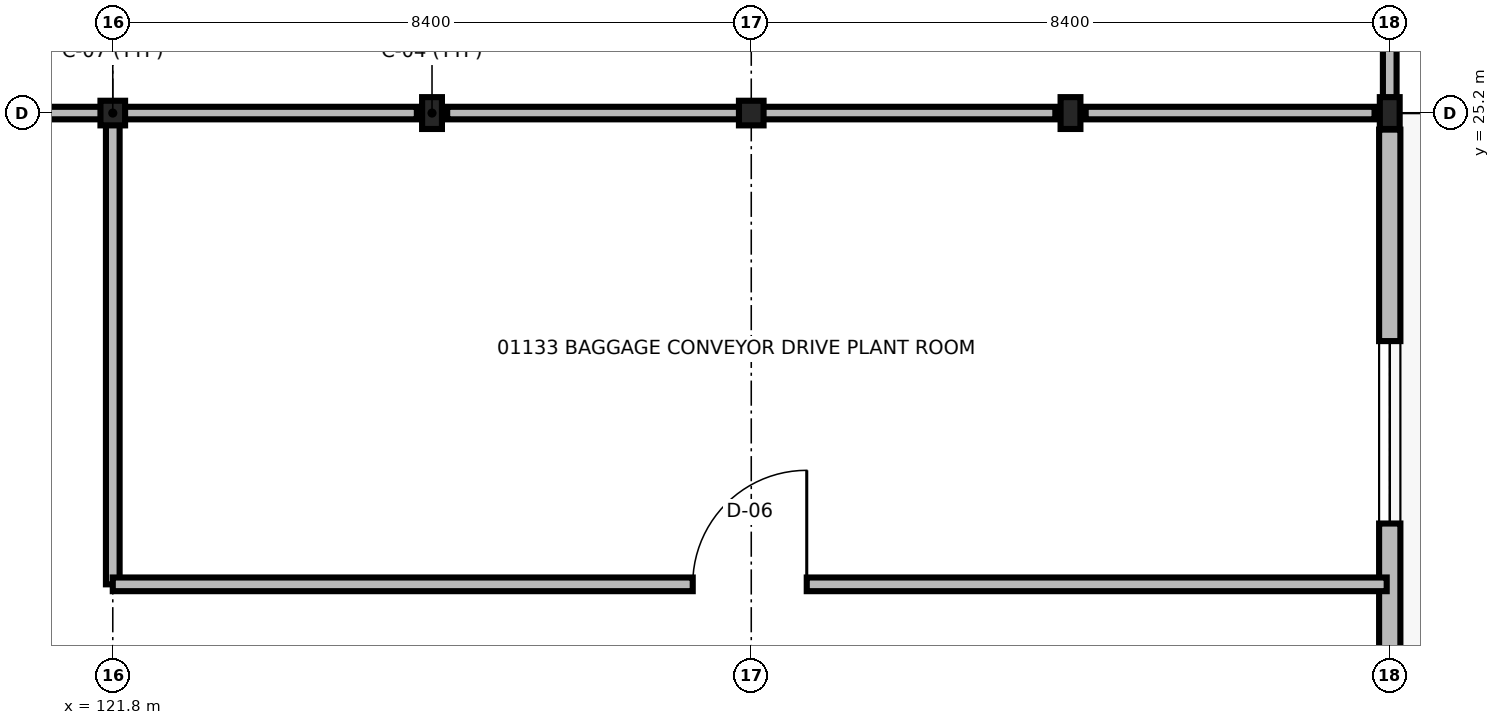
"""IFC4 building model, lengths in metres.
Left out: names, types, materials, properties, quantities, classifications, styles, units other than length and angle.
Written with IfcOpenShell. Run it as: python <this file> out.ifc"""

import sys

from ifc_helpers import new_model, si_unit, direction, frame, frame_2d, origin, origin_2d, place, context, subcontext, project, spatial, rectangle, hollow_circle, i_section, extrude, element, fill, save


model = new_model("IFC4")
c1 = context("Model", 3, precision=1e-05, world=origin(), true_north=direction((0.0, 1.0)))
c2 = subcontext(c1, "Body", "Model", "MODEL_VIEW")
j1 = project(units=[si_unit("LENGTHUNIT", "METRE"), si_unit("PLANEANGLEUNIT", "RADIAN")], contexts=[c1])
p1 = place(None, origin())
s1 = spatial("IfcSite", under=j1, at=p1, CompositionType="ELEMENT")
p2 = place(p1, origin())
s2 = spatial("IfcBuilding", under=s1, at=p2, CompositionType="ELEMENT")
p3 = place(p2, frame((0.0, 0.0, 5.1)))
s3 = spatial("IfcBuildingStorey", under=s2, at=p3, CompositionType="ELEMENT", Elevation=5.1)
for number, where, z_axis, x_axis in (
    (1, (121.8, 25.2, 0.0), (0.0, 0.0, 1.0), (1.0, 0.0, 0.0)),
    (2, (130.2, 25.2, 0.0), (0.0, 0.0, 1.0), (1.0, 0.0, 0.0)),
):
    element("IfcColumn", number, at=place(p3, frame(where, z_axis=z_axis, x_axis=x_axis)), inside=s3, PredefinedType="COLUMN", context=c2, shape_type="SweptSolid", body=[
        extrude(hollow_circle(Radius=0.162, WallThickness=0.013, at=origin_2d()), origin(), (0.0, 0.0, 1.0), 4.5),
    ])
for number, where, z_axis, x_axis in (
    (3, (138.6, 25.2, 0.0), (0.0, 0.0, 1.0), (1.0, 0.0, 0.0)),
    (4, (126.0, 25.2, 0.0), (0.0, 0.0, 1.0), (1.0, 0.0, 0.0)),
    (5, (134.4, 25.2, 0.0), (0.0, 0.0, 1.0), (1.0, 0.0, 0.0)),
):
    element("IfcColumn", number, at=place(p3, frame(where, z_axis=z_axis, x_axis=x_axis)), inside=s3, PredefinedType="COLUMN", context=c2, shape_type="SweptSolid", body=[
        extrude(i_section(OverallWidth=0.261, OverallDepth=0.419, WebThickness=0.012, FlangeThickness=0.019, at=origin_2d()), origin(), (0.0, 0.0, 1.0), 4.5),
    ])
p4 = place(p3, frame((138.6, 24.982, 0.0), z_axis=(0.0, 0.0, 1.0), x_axis=(0.0, -1.0, 0.0)))
e6 = element("IfcWall", 6, at=p4, inside=s3, PredefinedType="SOLIDWALL", context=c2, shape_type="SweptSolid", body=[
    extrude(rectangle(XDim=7.965, YDim=0.28, at=frame_2d((3.982, 0.0))), origin(), (0.0, 0.0, 1.0), 3.623),
])
p5 = place(p4, frame((2.782, 0.0, 0.95)))
e7 = element("IfcOpeningElement", 7, at=p5, cuts=e6, PredefinedType="OPENING", context=c2, shape_type="SweptSolid", body=[
    extrude(rectangle(XDim=2.4, YDim=1.75, at=frame_2d((1.2, 0.875))), frame((0.0, 0.15, 0.0), z_axis=(0.0, -1.0, 0.0), x_axis=(1.0, 0.0, 0.0)), (0.0, 0.0, 1.0), 0.3),
])
p6 = place(p3, frame((138.6, 25.4, 0.0), z_axis=(0.0, 0.0, 1.0), x_axis=(0.0, 1.0, 0.0)))
e8 = element("IfcWall", 8, at=p6, inside=s3, PredefinedType="PARTITIONING", context=c2, shape_type="SweptSolid", body=[
    extrude(rectangle(XDim=7.9, YDim=0.18, at=frame_2d((3.95, 0.0))), origin(), (0.0, 0.0, 1.0), 3.623),
])
p7 = place(p6, frame((3.025, 0.0, 0.0)))
e9 = element("IfcOpeningElement", 9, at=p7, cuts=e8, PredefinedType="OPENING", context=c2, shape_type="SweptSolid", body=[
    extrude(rectangle(XDim=1.85, YDim=2.3, at=frame_2d((0.925, 1.15))), frame((0.0, 0.1, 0.0), z_axis=(0.0, -1.0, 0.0), x_axis=(1.0, 0.0, 0.0)), (0.0, 0.0, 1.0), 0.2),
])
p8 = place(p3, frame((118.2, 25.2, 0.0), z_axis=(0.0, 0.0, 1.0), x_axis=(1.0, 0.0, 0.0)))
e10 = element("IfcWall", 10, at=p8, inside=s3, PredefinedType="PARTITIONING", context=c2, shape_type="SweptSolid", body=[
    extrude(rectangle(XDim=3.6, YDim=0.165, at=frame_2d((1.8, 0.0))), origin(), (0.0, 0.0, 1.0), 3.623),
])
p9 = place(p8, frame((0.95, 0.0, 0.0)))
e11 = element("IfcOpeningElement", 11, at=p9, cuts=e10, PredefinedType="OPENING", context=c2, shape_type="SweptSolid", body=[
    extrude(rectangle(XDim=1.7, YDim=2.25, at=frame_2d((0.85, 1.125))), frame((0.0, 0.093, 0.0), z_axis=(0.0, -1.0, 0.0), x_axis=(1.0, 0.0, 0.0)), (0.0, 0.0, 1.0), 0.185),
])
for number, where, z_axis, x_axis in (
    (12, (121.952, 25.2, 0.0), (0.0, 0.0, 1.0), (1.0, 0.0, 0.0)),
    (13, (126.199, 25.2, 0.0), (0.0, 0.0, 1.0), (1.0, 0.0, 0.0)),
):
    element("IfcWall", number, at=place(p3, frame(where, z_axis=z_axis, x_axis=x_axis)), inside=s3, PredefinedType="PARTITIONING", context=c2, shape_type="SweptSolid", body=[
        extrude(rectangle(XDim=3.849, YDim=0.165, at=frame_2d((1.924, 0.0))), origin(), (0.0, 0.0, 1.0), 3.804),
    ])
p10 = place(p3, frame((130.352, 25.2, 0.0), z_axis=(0.0, 0.0, 1.0), x_axis=(1.0, 0.0, 0.0)))
e14 = element("IfcWall", 14, at=p10, inside=s3, PredefinedType="PARTITIONING", context=c2, shape_type="SweptSolid", body=[
    extrude(rectangle(XDim=3.848, YDim=0.165, at=frame_2d((1.924, 0.0))), origin(), (0.0, 0.0, 1.0), 3.804),
])
p11 = place(p3, frame((134.6, 25.2, 0.0), z_axis=(0.0, 0.0, 1.0), x_axis=(1.0, 0.0, 0.0)))
e15 = element("IfcWall", 15, at=p11, inside=s3, PredefinedType="PARTITIONING", context=c2, shape_type="SweptSolid", body=[
    extrude(rectangle(XDim=3.8, YDim=0.165, at=frame_2d((1.9, 0.0))), origin(), (0.0, 0.0, 1.0), 3.804),
])
p12 = place(p3, frame((121.8, 19.0, 0.0), z_axis=(0.0, 0.0, 1.0), x_axis=(0.0, 1.0, 0.0)))
e16 = element("IfcWall", 16, at=p12, inside=s3, PredefinedType="PARTITIONING", context=c2, shape_type="SweptSolid", body=[
    extrude(rectangle(XDim=6.2, YDim=0.18, at=frame_2d((3.1, 0.0))), origin(), (0.0, 0.0, 1.0), 3.623),
])
p13 = place(p3, frame((121.8, 19.0, 0.0), z_axis=(0.0, 0.0, 1.0), x_axis=(1.0, 0.0, 0.0)))
e17 = element("IfcWall", 17, at=p13, inside=s3, PredefinedType="PARTITIONING", context=c2, shape_type="SweptSolid", body=[
    extrude(rectangle(XDim=16.76, YDim=0.18, at=frame_2d((8.38, 0.0))), origin(), (0.0, 0.0, 1.0), 3.623),
])
p14 = place(p13, frame((7.63, 0.0, 0.0)))
e18 = element("IfcOpeningElement", 18, at=p14, cuts=e17, PredefinedType="OPENING", context=c2, shape_type="SweptSolid", body=[
    extrude(rectangle(XDim=1.5, YDim=2.25, at=frame_2d((0.75, 1.125))), frame((0.0, 0.1, 0.0), z_axis=(0.0, -1.0, 0.0), x_axis=(1.0, 0.0, 0.0)), (0.0, 0.0, 1.0), 0.2),
])
p15 = place(p5, origin())
e19 = element("IfcWindow", 19, at=p15, inside=s3, PartitioningType="SINGLE_PANEL", PredefinedType="WINDOW", context=c2, shape_type="SweptSolid", body=[
    extrude(rectangle(XDim=2.4, YDim=1.75, at=frame_2d((1.2, 0.875))), frame((0.0, 0.03, 0.0), z_axis=(0.0, -1.0, 0.0), x_axis=(1.0, 0.0, 0.0)), (0.0, 0.0, 1.0), 0.06),
])
fill(e7, e19)
p16 = place(p14, frame((1.5, 0.0, 0.0), z_axis=(0.0, 0.0, 1.0), x_axis=(-1.0, 0.0, 0.0)))
e20 = element("IfcDoor", 20, at=p16, inside=s3, OperationType="SINGLE_SWING_LEFT", PredefinedType="DOOR", context=c2, shape_type="SweptSolid", body=[
    extrude(rectangle(XDim=1.5, YDim=2.25, at=frame_2d((0.75, 1.125))), frame((0.0, 0.025, 0.0), z_axis=(0.0, -1.0, 0.0), x_axis=(1.0, 0.0, 0.0)), (0.0, 0.0, 1.0), 0.05),
])
fill(e18, e20)
save(model, sys.argv[1])
